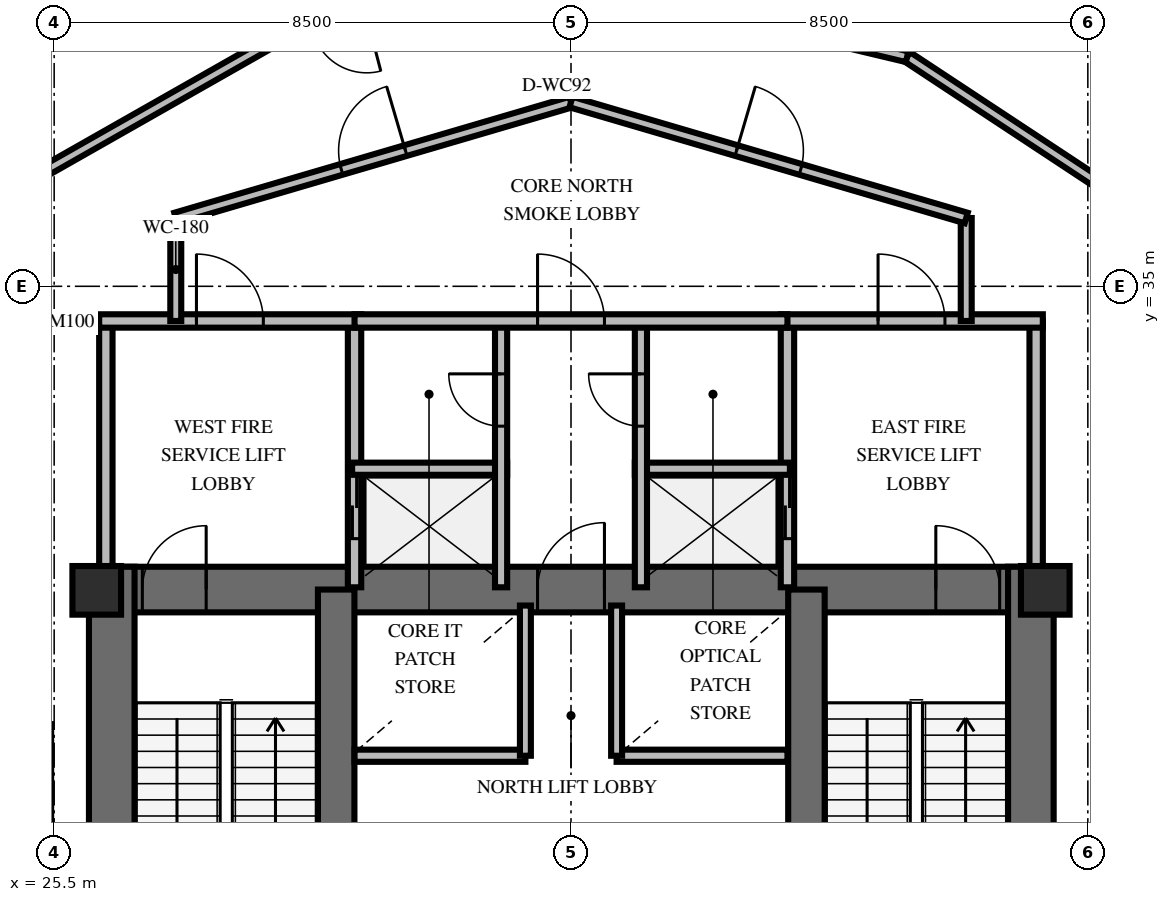
"""IFC4 building model, lengths in metres.
Left out: names, types, materials, properties, quantities, classifications, styles, units other than length and angle.
Written with IfcOpenShell. Run it as: python <this file> out.ifc"""

import sys

from ifc_helpers import new_model, si_unit, direction, frame, frame_2d, origin, origin_2d, place, context, subcontext, project, spatial, rectangle, extrude, element, fill, save


model = new_model("IFC4")
c1 = context("Model", 3, precision=1e-05, world=origin(), true_north=direction((0.0, 1.0)))
c2 = subcontext(c1, "Body", "Model", "MODEL_VIEW")
j1 = project(units=[si_unit("LENGTHUNIT", "METRE"), si_unit("PLANEANGLEUNIT", "RADIAN")], contexts=[c1])
p1 = place(None, origin())
s1 = spatial("IfcSite", under=j1, at=p1, CompositionType="ELEMENT")
p2 = place(p1, origin())
s2 = spatial("IfcBuilding", under=s1, at=p2, CompositionType="ELEMENT")
p3 = place(p2, frame((0.0, 0.0, 145.8)))
s3 = spatial("IfcBuildingStorey", under=s2, at=p3, CompositionType="ELEMENT", Elevation=145.8)
p4 = place(p3, frame((26.072, 30.013, 0.0), z_axis=(0.0, 0.0, 1.0), x_axis=(1.0, 0.0, 0.0)))
e1 = element("IfcWall", 1, at=p4, inside=s3, PredefinedType="SHEAR", context=c2, shape_type="SweptSolid", body=[
    extrude(rectangle(XDim=15.866, YDim=0.75, at=frame_2d((7.933, 0.0))), origin(), (0.0, 0.0, 1.0), 4.0),
])
p5 = place(p4, frame((0.878, 0.0, 0.0)))
e2 = element("IfcOpeningElement", 2, at=p5, cuts=e1, PredefinedType="OPENING", context=c2, shape_type="SweptSolid", body=[
    extrude(rectangle(XDim=1.05, YDim=2.15, at=frame_2d((0.525, 1.075))), frame((0.0, 0.385, 0.0), z_axis=(0.0, -1.0, 0.0), x_axis=(1.0, 0.0, 0.0)), (0.0, 0.0, 1.0), 0.77),
])
p6 = place(p4, frame((13.928, 0.0, 0.0)))
e3 = element("IfcOpeningElement", 3, at=p6, cuts=e1, PredefinedType="OPENING", context=c2, shape_type="SweptSolid", body=[
    extrude(rectangle(XDim=1.05, YDim=2.15, at=frame_2d((0.525, 1.075))), frame((0.0, 0.385, 0.0), z_axis=(0.0, -1.0, 0.0), x_axis=(1.0, 0.0, 0.0)), (0.0, 0.0, 1.0), 0.77),
])
p7 = place(p4, frame((7.378, 0.0, 0.0)))
e4 = element("IfcOpeningElement", 4, at=p7, cuts=e1, PredefinedType="OPENING", context=c2, shape_type="SweptSolid", body=[
    extrude(rectangle(XDim=1.1, YDim=2.15, at=frame_2d((0.55, 1.075))), frame((0.0, 0.385, 0.0), z_axis=(0.0, -1.0, 0.0), x_axis=(1.0, 0.0, 0.0)), (0.0, 0.0, 1.0), 0.77),
])
for number, where, z_axis, x_axis in (
    (5, (26.447, 19.812, 0.0), (0.0, 0.0, 1.0), (0.0, 1.0, 0.0)),
    (6, (41.563, 19.812, 0.0), (0.0, 0.0, 1.0), (0.0, 1.0, 0.0)),
):
    element("IfcWall", number, at=place(p3, frame(where, z_axis=z_axis, x_axis=x_axis)), inside=s3, PredefinedType="SHEAR", context=c2, shape_type="SweptSolid", body=[
        extrude(rectangle(XDim=10.576, YDim=0.75, at=frame_2d((5.288, 0.0))), origin(), (0.0, 0.0, 1.0), 4.0),
    ])
for number, where, z_axis, x_axis in (
    (7, (30.138, 20.187, 0.0), (0.0, 0.0, 1.0), (0.0, 1.0, 0.0)),
    (8, (37.872, 20.187, 0.0), (0.0, 0.0, 1.0), (0.0, 1.0, 0.0)),
):
    element("IfcWall", number, at=place(p3, frame(where, z_axis=z_axis, x_axis=x_axis)), inside=s3, PredefinedType="SHEAR", context=c2, shape_type="SweptSolid", body=[
        extrude(rectangle(XDim=9.826, YDim=0.6, at=frame_2d((4.913, 0.0))), origin(), (0.0, 0.0, 1.0), 4.0),
    ])
for number, where, z_axis, x_axis in (
    (9, (26.2, 30.0, 0.0), (0.0, 0.0, 1.0), (1.0, 0.0, 0.0)),
    (10, (41.8, 30.0, 0.0), (0.0, 0.0, 1.0), (1.0, 0.0, 0.0)),
):
    element("IfcColumn", number, at=place(p3, frame(where, z_axis=z_axis, x_axis=x_axis)), inside=s3, PredefinedType="PILASTER", context=c2, shape_type="SweptSolid", body=[
        extrude(rectangle(XDim=0.8, YDim=0.8, at=origin_2d()), origin(), (0.0, 0.0, 1.0), 4.0),
    ])
p8 = place(p3, frame((26.35, 30.05, 0.0), z_axis=(0.0, 0.0, 1.0), x_axis=(0.0, 1.0, 0.0)))
e11 = element("IfcWall", 11, at=p8, inside=s3, PredefinedType="SOLIDWALL", context=c2, shape_type="SweptSolid", body=[
    extrude(rectangle(XDim=4.38, YDim=0.22, at=frame_2d((2.19, 0.0))), origin(), (0.0, 0.0, 1.0), 2.8),
])
p9 = place(p3, frame((30.44, 30.05, 0.0), z_axis=(0.0, 0.0, 1.0), x_axis=(0.0, 1.0, 0.0)))
e12 = element("IfcWall", 12, at=p9, inside=s3, PredefinedType="SOLIDWALL", context=c2, shape_type="SweptSolid", body=[
    extrude(rectangle(XDim=4.38, YDim=0.22, at=frame_2d((2.19, 0.0))), origin(), (0.0, 0.0, 1.0), 2.8),
])
p10 = place(p9, frame((0.8, 0.0, 0.0)))
e13 = element("IfcOpeningElement", 13, at=p10, cuts=e12, PredefinedType="OPENING", context=c2, shape_type="SweptSolid", body=[
    extrude(rectangle(XDim=1.05, YDim=2.1, at=frame_2d((0.525, 1.05))), frame((0.0, 0.12, 0.0), z_axis=(0.0, -1.0, 0.0), x_axis=(1.0, 0.0, 0.0)), (0.0, 0.0, 1.0), 0.24),
])
p11 = place(p3, frame((26.24, 34.43, 0.0), z_axis=(0.0, 0.0, 1.0), x_axis=(1.0, 0.0, 0.0)))
e14 = element("IfcWall", 14, at=p11, inside=s3, PredefinedType="SOLIDWALL", context=c2, shape_type="SweptSolid", body=[
    extrude(rectangle(XDim=4.31, YDim=0.22, at=frame_2d((2.155, 0.0))), origin(), (0.0, 0.0, 1.0), 2.8),
])
p12 = place(p11, frame((1.6, 0.0, 0.0)))
e15 = element("IfcOpeningElement", 15, at=p12, cuts=e14, PredefinedType="OPENING", context=c2, shape_type="SweptSolid", body=[
    extrude(rectangle(XDim=1.1, YDim=2.15, at=frame_2d((0.55, 1.075))), frame((0.0, 0.12, 0.0), z_axis=(0.0, -1.0, 0.0), x_axis=(1.0, 0.0, 0.0)), (0.0, 0.0, 1.0), 0.24),
])
p13 = place(p3, frame((30.4, 32.0, 0.0), z_axis=(0.0, 0.0, 1.0), x_axis=(1.0, 0.0, 0.0)))
e16 = element("IfcWall", 16, at=p13, inside=s3, PredefinedType="SOLIDWALL", context=c2, shape_type="SweptSolid", body=[
    extrude(rectangle(XDim=2.55, YDim=0.2, at=frame_2d((1.275, 0.0))), origin(), (0.0, 0.0, 1.0), 2.8),
])
p14 = place(p3, frame((32.85, 30.05, 0.0), z_axis=(0.0, 0.0, 1.0), x_axis=(0.0, 1.0, 0.0)))
e17 = element("IfcWall", 17, at=p14, inside=s3, PredefinedType="SOLIDWALL", context=c2, shape_type="SweptSolid", body=[
    extrude(rectangle(XDim=4.38, YDim=0.2, at=frame_2d((2.19, 0.0))), origin(), (0.0, 0.0, 1.0), 2.8),
])
p15 = place(p14, frame((2.65, 0.0, 0.0)))
e18 = element("IfcOpeningElement", 18, at=p15, cuts=e17, PredefinedType="OPENING", context=c2, shape_type="SweptSolid", body=[
    extrude(rectangle(XDim=0.86, YDim=2.05, at=frame_2d((0.43, 1.025))), frame((0.0, 0.11, 0.0), z_axis=(0.0, -1.0, 0.0), x_axis=(1.0, 0.0, 0.0)), (0.0, 0.0, 1.0), 0.22),
])
p16 = place(p3, frame((37.56, 30.05, 0.0), z_axis=(0.0, 0.0, 1.0), x_axis=(0.0, 1.0, 0.0)))
e19 = element("IfcWall", 19, at=p16, inside=s3, PredefinedType="SOLIDWALL", context=c2, shape_type="SweptSolid", body=[
    extrude(rectangle(XDim=4.38, YDim=0.22, at=frame_2d((2.19, 0.0))), origin(), (0.0, 0.0, 1.0), 2.8),
])
p17 = place(p16, frame((0.8, 0.0, 0.0)))
e20 = element("IfcOpeningElement", 20, at=p17, cuts=e19, PredefinedType="OPENING", context=c2, shape_type="SweptSolid", body=[
    extrude(rectangle(XDim=1.05, YDim=2.1, at=frame_2d((0.525, 1.05))), frame((0.0, 0.12, 0.0), z_axis=(0.0, -1.0, 0.0), x_axis=(1.0, 0.0, 0.0)), (0.0, 0.0, 1.0), 0.24),
])
p18 = place(p3, frame((41.65, 30.05, 0.0), z_axis=(0.0, 0.0, 1.0), x_axis=(0.0, 1.0, 0.0)))
e21 = element("IfcWall", 21, at=p18, inside=s3, PredefinedType="SOLIDWALL", context=c2, shape_type="SweptSolid", body=[
    extrude(rectangle(XDim=4.38, YDim=0.22, at=frame_2d((2.19, 0.0))), origin(), (0.0, 0.0, 1.0), 2.8),
])
p19 = place(p3, frame((37.45, 34.43, 0.0), z_axis=(0.0, 0.0, 1.0), x_axis=(1.0, 0.0, 0.0)))
e22 = element("IfcWall", 22, at=p19, inside=s3, PredefinedType="SOLIDWALL", context=c2, shape_type="SweptSolid", body=[
    extrude(rectangle(XDim=4.31, YDim=0.22, at=frame_2d((2.155, 0.0))), origin(), (0.0, 0.0, 1.0), 2.8),
])
p20 = place(p19, frame((1.6, 0.0, 0.0)))
e23 = element("IfcOpeningElement", 23, at=p20, cuts=e22, PredefinedType="OPENING", context=c2, shape_type="SweptSolid", body=[
    extrude(rectangle(XDim=1.1, YDim=2.15, at=frame_2d((0.55, 1.075))), frame((0.0, 0.12, 0.0), z_axis=(0.0, -1.0, 0.0), x_axis=(1.0, 0.0, 0.0)), (0.0, 0.0, 1.0), 0.24),
])
p21 = place(p3, frame((35.05, 32.0, 0.0), z_axis=(0.0, 0.0, 1.0), x_axis=(1.0, 0.0, 0.0)))
e24 = element("IfcWall", 24, at=p21, inside=s3, PredefinedType="SOLIDWALL", context=c2, shape_type="SweptSolid", body=[
    extrude(rectangle(XDim=2.55, YDim=0.2, at=frame_2d((1.275, 0.0))), origin(), (0.0, 0.0, 1.0), 2.8),
])
p22 = place(p3, frame((35.15, 30.05, 0.0), z_axis=(0.0, 0.0, 1.0), x_axis=(0.0, 1.0, 0.0)))
e25 = element("IfcWall", 25, at=p22, inside=s3, PredefinedType="SOLIDWALL", context=c2, shape_type="SweptSolid", body=[
    extrude(rectangle(XDim=4.38, YDim=0.2, at=frame_2d((2.19, 0.0))), origin(), (0.0, 0.0, 1.0), 2.8),
])
p23 = place(p22, frame((2.65, 0.0, 0.0)))
e26 = element("IfcOpeningElement", 26, at=p23, cuts=e25, PredefinedType="OPENING", context=c2, shape_type="SweptSolid", body=[
    extrude(rectangle(XDim=0.86, YDim=2.05, at=frame_2d((0.43, 1.025))), frame((0.0, 0.11, 0.0), z_axis=(0.0, -1.0, 0.0), x_axis=(1.0, 0.0, 0.0)), (0.0, 0.0, 1.0), 0.22),
])
p24 = place(p3, frame((30.44, 34.43, 0.0), z_axis=(0.0, 0.0, 1.0), x_axis=(1.0, 0.0, 0.0)))
e27 = element("IfcWall", 27, at=p24, inside=s3, PredefinedType="SOLIDWALL", context=c2, shape_type="SweptSolid", body=[
    extrude(rectangle(XDim=7.12, YDim=0.22, at=frame_2d((3.56, 0.0))), origin(), (0.0, 0.0, 1.0), 2.8),
])
p25 = place(p24, frame((3.01, 0.0, 0.0)))
e28 = element("IfcOpeningElement", 28, at=p25, cuts=e27, PredefinedType="OPENING", context=c2, shape_type="SweptSolid", body=[
    extrude(rectangle(XDim=1.1, YDim=2.15, at=frame_2d((0.55, 1.075))), frame((0.0, 0.12, 0.0), z_axis=(0.0, -1.0, 0.0), x_axis=(1.0, 0.0, 0.0)), (0.0, 0.0, 1.0), 0.24),
])
p26 = place(p3, frame((30.44, 27.28, 0.0), z_axis=(0.0, 0.0, 1.0), x_axis=(1.0, 0.0, 0.0)))
e29 = element("IfcWall", 29, at=p26, inside=s3, PredefinedType="SOLIDWALL", context=c2, shape_type="SweptSolid", body=[
    extrude(rectangle(XDim=2.81, YDim=0.2, at=frame_2d((1.405, 0.0))), origin(), (0.0, 0.0, 1.0), 2.8),
])
p27 = place(p3, frame((33.25, 27.28, 0.0), z_axis=(0.0, 0.0, 1.0), x_axis=(0.0, 1.0, 0.0)))
e30 = element("IfcWall", 30, at=p27, inside=s3, PredefinedType="SOLIDWALL", context=c2, shape_type="SweptSolid", body=[
    extrude(rectangle(XDim=2.47, YDim=0.18, at=frame_2d((1.235, 0.0))), origin(), (0.0, 0.0, 1.0), 2.8),
])
p28 = place(p3, frame((34.75, 27.28, 0.0), z_axis=(0.0, 0.0, 1.0), x_axis=(1.0, 0.0, 0.0)))
e31 = element("IfcWall", 31, at=p28, inside=s3, PredefinedType="SOLIDWALL", context=c2, shape_type="SweptSolid", body=[
    extrude(rectangle(XDim=2.81, YDim=0.2, at=frame_2d((1.405, 0.0))), origin(), (0.0, 0.0, 1.0), 2.8),
])
p29 = place(p3, frame((34.75, 27.28, 0.0), z_axis=(0.0, 0.0, 1.0), x_axis=(0.0, 1.0, 0.0)))
e32 = element("IfcWall", 32, at=p29, inside=s3, PredefinedType="SOLIDWALL", context=c2, shape_type="SweptSolid", body=[
    extrude(rectangle(XDim=2.47, YDim=0.18, at=frame_2d((1.235, 0.0))), origin(), (0.0, 0.0, 1.0), 2.8),
])
for number, where, z_axis, x_axis in (
    (33, (27.5, 34.43, 0.0), (0.0, 0.0, 1.0), (0.0, 1.0, 0.0)),
    (34, (40.5, 36.123, 0.0), (0.0, 0.0, 1.0), (0.0, -1.0, 0.0)),
):
    element("IfcWall", number, at=place(p3, frame(where, z_axis=z_axis, x_axis=x_axis)), inside=s3, PredefinedType="PARTITIONING", context=c2, shape_type="SweptSolid", body=[
        extrude(rectangle(XDim=1.693, YDim=0.18, at=frame_2d((0.846, 0.0))), origin(), (0.0, 0.0, 1.0), 2.8),
    ])
p30 = place(p3, frame((27.5, 36.123, 0.0), z_axis=(0.0, 0.0, 1.0), x_axis=(0.959546654541, 0.281549671923, 0.0)))
e35 = element("IfcWall", 35, at=p30, inside=s3, PredefinedType="PARTITIONING", context=c2, shape_type="SweptSolid", body=[
    extrude(rectangle(XDim=6.774, YDim=0.18, at=frame_2d((3.387, 0.0))), origin(), (0.0, 0.0, 1.0), 2.8),
])
p31 = place(p30, frame((2.837, 0.0, 0.0)))
e36 = element("IfcOpeningElement", 36, at=p31, cuts=e35, PredefinedType="OPENING", context=c2, shape_type="SweptSolid", body=[
    extrude(rectangle(XDim=1.1, YDim=2.15, at=frame_2d((0.55, 1.075))), frame((0.0, 0.1, 0.0), z_axis=(0.0, -1.0, 0.0), x_axis=(1.0, 0.0, 0.0)), (0.0, 0.0, 1.0), 0.2),
])
p32 = place(p3, frame((34.0, 38.03, 0.0), z_axis=(0.0, 0.0, 1.0), x_axis=(0.959546654541, -0.281549671923, 0.0)))
e37 = element("IfcWall", 37, at=p32, inside=s3, PredefinedType="PARTITIONING", context=c2, shape_type="SweptSolid", body=[
    extrude(rectangle(XDim=6.774, YDim=0.18, at=frame_2d((3.387, 0.0))), origin(), (0.0, 0.0, 1.0), 2.8),
])
p33 = place(p32, frame((2.837, 0.0, 0.0)))
e38 = element("IfcOpeningElement", 38, at=p33, cuts=e37, PredefinedType="OPENING", context=c2, shape_type="SweptSolid", body=[
    extrude(rectangle(XDim=1.1, YDim=2.15, at=frame_2d((0.55, 1.075))), frame((0.0, 0.1, 0.0), z_axis=(0.0, -1.0, 0.0), x_axis=(1.0, 0.0, 0.0)), (0.0, 0.0, 1.0), 0.2),
])
p34 = place(p3, frame((29.102, 39.03, 0.0), z_axis=(0.0, 0.0, 1.0), x_axis=(-0.869516749936, -0.493903453703, 0.0)))
e39 = element("IfcWall", 39, at=p34, inside=s3, PredefinedType="PARTITIONING", context=c2, shape_type="SweptSolid", body=[
    extrude(rectangle(XDim=4.355, YDim=0.18, at=frame_2d((2.177, 0.0))), origin(), (0.0, 0.0, 1.0), 2.8),
])
p35 = place(p3, frame((43.564, 36.114, 0.0), z_axis=(0.0, 0.0, 1.0), x_axis=(-0.834852183568, 0.550474187943, 0.0)))
e40 = element("IfcWall", 40, at=p35, inside=s3, PredefinedType="PARTITIONING", context=c2, shape_type="SweptSolid", body=[
    extrude(rectangle(XDim=4.834, YDim=0.18, at=frame_2d((2.417, 0.0))), origin(), (0.0, 0.0, 1.0), 2.8),
])
p36 = place(p3, frame((39.528, 38.775, 0.0), z_axis=(0.0, 0.0, 1.0), x_axis=(-0.972776947404, 0.231743415441, 0.0)))
e41 = element("IfcWall", 41, at=p36, inside=s3, PredefinedType="PARTITIONING", context=c2, shape_type="SweptSolid", body=[
    extrude(rectangle(XDim=4.834, YDim=0.18, at=frame_2d((2.417, 0.0))), origin(), (0.0, 0.0, 1.0), 2.8),
])
p37 = place(p5, origin())
e42 = element("IfcDoor", 42, at=p37, inside=s3, OperationType="SINGLE_SWING_RIGHT", PredefinedType="DOOR", context=c2, shape_type="SweptSolid", body=[
    extrude(rectangle(XDim=1.05, YDim=2.15, at=frame_2d((0.525, 1.075))), frame((0.0, 0.025, 0.0), z_axis=(0.0, -1.0, 0.0), x_axis=(1.0, 0.0, 0.0)), (0.0, 0.0, 1.0), 0.05),
])
fill(e2, e42)
p38 = place(p6, origin())
e43 = element("IfcDoor", 43, at=p38, inside=s3, OperationType="SINGLE_SWING_LEFT", PredefinedType="DOOR", context=c2, shape_type="SweptSolid", body=[
    extrude(rectangle(XDim=1.05, YDim=2.15, at=frame_2d((0.525, 1.075))), frame((0.0, 0.025, 0.0), z_axis=(0.0, -1.0, 0.0), x_axis=(1.0, 0.0, 0.0)), (0.0, 0.0, 1.0), 0.05),
])
fill(e3, e43)
p39 = place(p7, origin())
e44 = element("IfcDoor", 44, at=p39, inside=s3, OperationType="SINGLE_SWING_RIGHT", PredefinedType="DOOR", context=c2, shape_type="SweptSolid", body=[
    extrude(rectangle(XDim=1.1, YDim=2.15, at=frame_2d((0.55, 1.075))), frame((0.0, 0.025, 0.0), z_axis=(0.0, -1.0, 0.0), x_axis=(1.0, 0.0, 0.0)), (0.0, 0.0, 1.0), 0.05),
])
fill(e4, e44)
p40 = place(p12, origin())
e45 = element("IfcDoor", 45, at=p40, inside=s3, OperationType="SINGLE_SWING_LEFT", PredefinedType="DOOR", context=c2, shape_type="SweptSolid", body=[
    extrude(rectangle(XDim=1.1, YDim=2.15, at=frame_2d((0.55, 1.075))), frame((0.0, 0.025, 0.0), z_axis=(0.0, -1.0, 0.0), x_axis=(1.0, 0.0, 0.0)), (0.0, 0.0, 1.0), 0.05),
])
fill(e15, e45)
p41 = place(p10, origin())
e46 = element("IfcDoor", 46, at=p41, inside=s3, OperationType="DOUBLE_DOOR_SLIDING", PredefinedType="USERDEFINED", context=c2, shape_type="SweptSolid", body=[
    extrude(rectangle(XDim=1.05, YDim=2.1, at=frame_2d((0.525, 1.05))), frame((0.0, 0.025, 0.0), z_axis=(0.0, -1.0, 0.0), x_axis=(1.0, 0.0, 0.0)), (0.0, 0.0, 1.0), 0.05),
])
fill(e13, e46)
p42 = place(p15, origin())
e47 = element("IfcDoor", 47, at=p42, inside=s3, OperationType="SINGLE_SWING_RIGHT", PredefinedType="TRAPDOOR", context=c2, shape_type="SweptSolid", body=[
    extrude(rectangle(XDim=0.86, YDim=2.05, at=frame_2d((0.43, 1.025))), frame((0.0, 0.025, 0.0), z_axis=(0.0, -1.0, 0.0), x_axis=(1.0, 0.0, 0.0)), (0.0, 0.0, 1.0), 0.05),
])
fill(e18, e47)
p43 = place(p20, origin())
e48 = element("IfcDoor", 48, at=p43, inside=s3, OperationType="SINGLE_SWING_LEFT", PredefinedType="DOOR", context=c2, shape_type="SweptSolid", body=[
    extrude(rectangle(XDim=1.1, YDim=2.15, at=frame_2d((0.55, 1.075))), frame((0.0, 0.025, 0.0), z_axis=(0.0, -1.0, 0.0), x_axis=(1.0, 0.0, 0.0)), (0.0, 0.0, 1.0), 0.05),
])
fill(e23, e48)
p44 = place(p17, origin())
e49 = element("IfcDoor", 49, at=p44, inside=s3, OperationType="DOUBLE_DOOR_SLIDING", PredefinedType="USERDEFINED", context=c2, shape_type="SweptSolid", body=[
    extrude(rectangle(XDim=1.05, YDim=2.1, at=frame_2d((0.525, 1.05))), frame((0.0, 0.025, 0.0), z_axis=(0.0, -1.0, 0.0), x_axis=(1.0, 0.0, 0.0)), (0.0, 0.0, 1.0), 0.05),
])
fill(e20, e49)
p45 = place(p23, origin())
e50 = element("IfcDoor", 50, at=p45, inside=s3, OperationType="SINGLE_SWING_RIGHT", PredefinedType="TRAPDOOR", context=c2, shape_type="SweptSolid", body=[
    extrude(rectangle(XDim=0.86, YDim=2.05, at=frame_2d((0.43, 1.025))), frame((0.0, 0.025, 0.0), z_axis=(0.0, -1.0, 0.0), x_axis=(1.0, 0.0, 0.0)), (0.0, 0.0, 1.0), 0.05),
])
fill(e26, e50)
p46 = place(p25, origin())
e51 = element("IfcDoor", 51, at=p46, inside=s3, OperationType="SINGLE_SWING_LEFT", PredefinedType="DOOR", context=c2, shape_type="SweptSolid", body=[
    extrude(rectangle(XDim=1.1, YDim=2.15, at=frame_2d((0.55, 1.075))), frame((0.0, 0.025, 0.0), z_axis=(0.0, -1.0, 0.0), x_axis=(1.0, 0.0, 0.0)), (0.0, 0.0, 1.0), 0.05),
])
fill(e28, e51)
p47 = place(p31, origin())
e52 = element("IfcDoor", 52, at=p47, inside=s3, OperationType="SINGLE_SWING_RIGHT", PredefinedType="DOOR", context=c2, shape_type="SweptSolid", body=[
    extrude(rectangle(XDim=1.1, YDim=2.15, at=frame_2d((0.55, 1.075))), frame((0.0, 0.025, 0.0), z_axis=(0.0, -1.0, 0.0), x_axis=(1.0, 0.0, 0.0)), (0.0, 0.0, 1.0), 0.05),
])
fill(e36, e52)
p48 = place(p33, origin())
e53 = element("IfcDoor", 53, at=p48, inside=s3, OperationType="SINGLE_SWING_LEFT", PredefinedType="DOOR", context=c2, shape_type="SweptSolid", body=[
    extrude(rectangle(XDim=1.1, YDim=2.15, at=frame_2d((0.55, 1.075))), frame((0.0, 0.025, 0.0), z_axis=(0.0, -1.0, 0.0), x_axis=(1.0, 0.0, 0.0)), (0.0, 0.0, 1.0), 0.05),
])
fill(e38, e53)
save(model, sys.argv[1])
